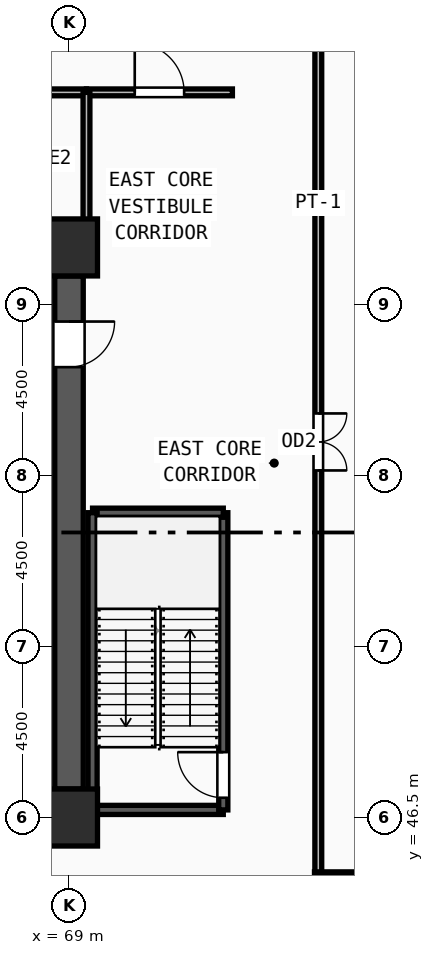
"""IFC4 building model, lengths in metres.
Left out: names, types, materials, properties, quantities, classifications, styles, units other than length and angle.
Written with IfcOpenShell. Run it as: python <this file> out.ifc"""

import sys

from ifc_helpers import new_model, si_unit, direction, frame, frame_2d, origin, origin_2d, place, context, subcontext, project, spatial, rectangle, extrude, source, transform, mapped, element, fill, save


model = new_model("IFC4")
c1 = context("Model", 3, precision=1e-05, world=origin(), true_north=direction((0.0, 1.0)))
c2 = subcontext(c1, "Body", "Model", "MODEL_VIEW")
j1 = project(units=[si_unit("LENGTHUNIT", "METRE"), si_unit("PLANEANGLEUNIT", "RADIAN")], contexts=[c1])
p1 = place(None, origin())
s1 = spatial("IfcSite", under=j1, at=p1, CompositionType="ELEMENT")
p2 = place(p1, origin())
s2 = spatial("IfcBuilding", under=s1, at=p2, CompositionType="ELEMENT")
p3 = place(p2, frame((0.0, 0.0, 97.5)))
s3 = spatial("IfcBuildingStorey", under=s2, at=p3, CompositionType="ELEMENT", Elevation=97.5)
m1 = source(origin(), c2, "Body", "SweptSolid", [
    extrude(rectangle(XDim=1.5, YDim=1.5, at=origin_2d()), origin(), (0.0, 0.0, 1.0), 4.5),
])
for number, where, z_axis, x_axis in (
    (1, (69.0, 46.5, 0.0), (0.0, 0.0, 1.0), (1.0, 0.0, 0.0)),
    (2, (69.0, 61.5, 0.0), (0.0, 0.0, 1.0), (1.0, 0.0, 0.0)),
):
    element("IfcColumn", number, at=place(p3, frame(where, z_axis=z_axis, x_axis=x_axis)), inside=s3, PredefinedType="COLUMN", context=c2, shape_type="MappedRepresentation", body=[
        mapped(m1, transform((0.0, 0.0, 0.0), x_axis=(1.0, 0.0, 0.0), y_axis=(0.0, 1.0, 0.0), z_axis=(0.0, 0.0, 1.0), scale=1.0)),
    ])
p4 = place(p3, frame((69.0, 60.75, 0.0), z_axis=(0.0, 0.0, 1.0), x_axis=(0.0, -1.0, 0.0)))
e3 = element("IfcWall", 3, at=p4, inside=s3, PredefinedType="SHEAR", context=c2, shape_type="SweptSolid", body=[
    extrude(rectangle(XDim=13.5, YDim=0.75, at=frame_2d((6.75, 0.0))), origin(), (0.0, 0.0, 1.0), 4.32),
])
m2 = source(origin(), c2, "Body", "SweptSolid", [
    extrude(rectangle(XDim=1.2, YDim=2.2, at=frame_2d((0.6, 1.1))), frame((0.0, 0.385, 0.0), z_axis=(0.0, -1.0, 0.0), x_axis=(1.0, 0.0, 0.0)), (0.0, 0.0, 1.0), 0.77),
])
p5 = place(p4, frame((1.2, 0.0, 0.0)))
e4 = element("IfcOpeningElement", 4, at=p5, cuts=e3, PredefinedType="OPENING", context=c2, shape_type="MappedRepresentation", body=[
    mapped(m2, transform((0.0, 0.0, 0.0), x_axis=(1.0, 0.0, 0.0), y_axis=(0.0, 1.0, 0.0), z_axis=(0.0, 0.0, 1.0), scale=1.0)),
])
p6 = place(p3, frame((69.62, 46.7, 0.0), z_axis=(0.0, 0.0, 1.0), x_axis=(1.0, 0.0, 0.0)))
e5 = element("IfcWall", 5, at=p6, inside=s3, PredefinedType="SOLIDWALL", context=c2, shape_type="SweptSolid", body=[
    extrude(rectangle(XDim=3.44, YDim=0.24, at=frame_2d((1.72, 0.0))), origin(), (0.0, 0.0, 1.0), 4.32),
])
p7 = place(p3, frame((73.06, 46.7, 0.0), z_axis=(0.0, 0.0, 1.0), x_axis=(0.0, 1.0, 0.0)))
e6 = element("IfcWall", 6, at=p7, inside=s3, PredefinedType="SOLIDWALL", context=c2, shape_type="SweptSolid", body=[
    extrude(rectangle(XDim=7.82, YDim=0.24, at=frame_2d((3.91, 0.0))), origin(), (0.0, 0.0, 1.0), 4.32),
])
m3 = source(origin(), c2, "Body", "SweptSolid", [
    extrude(rectangle(XDim=1.2, YDim=2.2, at=frame_2d((0.6, 1.1))), frame((0.0, 0.13, 0.0), z_axis=(0.0, -1.0, 0.0), x_axis=(1.0, 0.0, 0.0)), (0.0, 0.0, 1.0), 0.26),
])
p8 = place(p7, frame((0.32, 0.0, 0.0)))
e7 = element("IfcOpeningElement", 7, at=p8, cuts=e6, PredefinedType="OPENING", context=c2, shape_type="MappedRepresentation", body=[
    mapped(m3, transform((0.0, 0.0, 0.0), x_axis=(1.0, 0.0, 0.0), y_axis=(0.0, 1.0, 0.0), z_axis=(0.0, 0.0, 1.0), scale=1.0)),
])
p9 = place(p3, frame((73.06, 54.52, 0.0), z_axis=(0.0, 0.0, 1.0), x_axis=(-1.0, 0.0, 0.0)))
e8 = element("IfcWall", 8, at=p9, inside=s3, PredefinedType="SOLIDWALL", context=c2, shape_type="SweptSolid", body=[
    extrude(rectangle(XDim=3.44, YDim=0.24, at=frame_2d((1.72, 0.0))), origin(), (0.0, 0.0, 1.0), 4.32),
])
p10 = place(p3, frame((69.62, 54.52, 0.0), z_axis=(0.0, 0.0, 1.0), x_axis=(0.0, -1.0, 0.0)))
e9 = element("IfcWall", 9, at=p10, inside=s3, PredefinedType="SOLIDWALL", context=c2, shape_type="SweptSolid", body=[
    extrude(rectangle(XDim=7.82, YDim=0.24, at=frame_2d((3.91, 0.0))), origin(), (0.0, 0.0, 1.0), 4.32),
])
p11 = place(p3, frame((65.92, 65.58, 0.0), z_axis=(0.0, 0.0, 1.0), x_axis=(1.0, 0.0, 0.0)))
e10 = element("IfcWall", 10, at=p11, inside=s3, PredefinedType="PARTITIONING", context=c2, shape_type="SweptSolid", body=[
    extrude(rectangle(XDim=3.54, YDim=0.18, at=frame_2d((1.77, 0.0))), origin(), (0.0, 0.0, 1.0), 4.32),
])
m4 = source(origin(), c2, "Body", "SweptSolid", [
    extrude(rectangle(XDim=1.0, YDim=2.2, at=frame_2d((0.5, 1.1))), frame((0.0, 0.1, 0.0), z_axis=(0.0, -1.0, 0.0), x_axis=(1.0, 0.0, 0.0)), (0.0, 0.0, 1.0), 0.2),
])
p12 = place(p11, frame((1.27, 0.0, 0.0)))
e11 = element("IfcOpeningElement", 11, at=p12, cuts=e10, PredefinedType="OPENING", context=c2, shape_type="MappedRepresentation", body=[
    mapped(m4, transform((0.0, 0.0, 0.0), x_axis=(1.0, 0.0, 0.0), y_axis=(0.0, 1.0, 0.0), z_axis=(0.0, 0.0, 1.0), scale=1.0)),
])
p13 = place(p3, frame((69.46, 65.58, 0.0), z_axis=(0.0, 0.0, 1.0), x_axis=(1.0, 0.0, 0.0)))
e12 = element("IfcWall", 12, at=p13, inside=s3, PredefinedType="PARTITIONING", context=c2, shape_type="SweptSolid", body=[
    extrude(rectangle(XDim=3.84, YDim=0.18, at=frame_2d((1.92, 0.0))), origin(), (0.0, 0.0, 1.0), 4.32),
])
m5 = source(origin(), c2, "Body", "SweptSolid", [
    extrude(rectangle(XDim=1.3, YDim=2.2, at=frame_2d((0.65, 1.1))), frame((0.0, 0.1, 0.0), z_axis=(0.0, -1.0, 0.0), x_axis=(1.0, 0.0, 0.0)), (0.0, 0.0, 1.0), 0.2),
])
p14 = place(p13, frame((1.27, 0.0, 0.0)))
e13 = element("IfcOpeningElement", 13, at=p14, cuts=e12, PredefinedType="OPENING", context=c2, shape_type="MappedRepresentation", body=[
    mapped(m5, transform((0.0, 0.0, 0.0), x_axis=(1.0, 0.0, 0.0), y_axis=(0.0, 1.0, 0.0), z_axis=(0.0, 0.0, 1.0), scale=1.0)),
])
p15 = place(p3, frame((75.56, 67.98, 0.0), z_axis=(0.0, 0.0, 1.0), x_axis=(0.0, -1.0, 0.0)))
e14 = element("IfcWall", 14, at=p15, inside=s3, PredefinedType="PARTITIONING", context=c2, shape_type="SweptSolid", body=[
    extrude(rectangle(XDim=23.195, YDim=0.18, at=frame_2d((11.598, 0.0))), origin(), (0.0, 0.0, 1.0), 4.32),
])
m6 = source(origin(), c2, "Body", "SweptSolid", [
    extrude(rectangle(XDim=1.5, YDim=2.2, at=frame_2d((0.75, 1.1))), frame((0.0, 0.1, 0.0), z_axis=(0.0, -1.0, 0.0), x_axis=(1.0, 0.0, 0.0)), (0.0, 0.0, 1.0), 0.2),
])
p16 = place(p15, frame((10.848, 0.0, 0.0)))
e15 = element("IfcOpeningElement", 15, at=p16, cuts=e14, PredefinedType="OPENING", context=c2, shape_type="MappedRepresentation", body=[
    mapped(m6, transform((0.0, 0.0, 0.0), x_axis=(1.0, 0.0, 0.0), y_axis=(0.0, 1.0, 0.0), z_axis=(0.0, 0.0, 1.0), scale=1.0)),
])
p17 = place(p3, frame((69.46, 61.95, 0.0), z_axis=(0.0, 0.0, 1.0), x_axis=(0.0, 1.0, 0.0)))
e16 = element("IfcWall", 16, at=p17, inside=s3, PredefinedType="PARTITIONING", context=c2, shape_type="SweptSolid", body=[
    extrude(rectangle(XDim=3.63, YDim=0.18, at=frame_2d((1.815, 0.0))), origin(), (0.0, 0.0, 1.0), 4.32),
])
p18 = place(p3, frame((75.46, 45.0, 0.0), z_axis=(0.0, 0.0, 1.0), x_axis=(1.0, 0.0, 0.0)))
e17 = element("IfcWall", 17, at=p18, inside=s3, PredefinedType="PARTITIONING", context=c2, shape_type="SweptSolid", body=[
    extrude(rectangle(XDim=10.984, YDim=0.14, at=frame_2d((5.492, 0.0))), origin(), (0.0, 0.0, 1.0), 4.32),
])
m7 = source(origin(), c2, "Body", "SweptSolid", [
    extrude(rectangle(XDim=1.2, YDim=2.2, at=frame_2d((0.6, 1.1))), frame((0.0, 0.025, 0.0), z_axis=(0.0, -1.0, 0.0), x_axis=(1.0, 0.0, 0.0)), (0.0, 0.0, 1.0), 0.05),
])
p19 = place(p5, origin())
e18 = element("IfcDoor", 18, at=p19, inside=s3, OperationType="SINGLE_SWING_LEFT", PredefinedType="DOOR", context=c2, shape_type="MappedRepresentation", body=[
    mapped(m7, transform((0.0, 0.0, 0.0), x_axis=(1.0, 0.0, 0.0), y_axis=(0.0, 1.0, 0.0), z_axis=(0.0, 0.0, 1.0), scale=1.0)),
])
fill(e4, e18)
p20 = place(p8, origin())
e19 = element("IfcDoor", 19, at=p20, inside=s3, OperationType="SINGLE_SWING_RIGHT", PredefinedType="DOOR", context=c2, shape_type="MappedRepresentation", body=[
    mapped(m7, transform((0.0, 0.0, 0.0), x_axis=(1.0, 0.0, 0.0), y_axis=(0.0, 1.0, 0.0), z_axis=(0.0, 0.0, 1.0), scale=1.0)),
])
fill(e7, e19)
m8 = source(origin(), c2, "Body", "SweptSolid", [
    extrude(rectangle(XDim=1.3, YDim=2.2, at=frame_2d((0.65, 1.1))), frame((0.0, 0.025, 0.0), z_axis=(0.0, -1.0, 0.0), x_axis=(1.0, 0.0, 0.0)), (0.0, 0.0, 1.0), 0.05),
])
p21 = place(p14, origin())
e20 = element("IfcDoor", 20, at=p21, inside=s3, OperationType="SINGLE_SWING_LEFT", PredefinedType="DOOR", context=c2, shape_type="MappedRepresentation", body=[
    mapped(m8, transform((0.0, 0.0, 0.0), x_axis=(1.0, 0.0, 0.0), y_axis=(0.0, 1.0, 0.0), z_axis=(0.0, 0.0, 1.0), scale=1.0)),
])
fill(e13, e20)
m9 = source(origin(), c2, "Body", "SweptSolid", [
    extrude(rectangle(XDim=1.5, YDim=2.2, at=frame_2d((0.75, 1.1))), frame((0.0, 0.025, 0.0), z_axis=(0.0, -1.0, 0.0), x_axis=(1.0, 0.0, 0.0)), (0.0, 0.0, 1.0), 0.05),
])
p22 = place(p16, origin())
e21 = element("IfcDoor", 21, at=p22, inside=s3, OperationType="DOUBLE_DOOR_SINGLE_SWING", PredefinedType="DOOR", context=c2, shape_type="MappedRepresentation", body=[
    mapped(m9, transform((0.0, 0.0, 0.0), x_axis=(1.0, 0.0, 0.0), y_axis=(0.0, 1.0, 0.0), z_axis=(0.0, 0.0, 1.0), scale=1.0)),
])
fill(e15, e21)
save(model, sys.argv[1])
